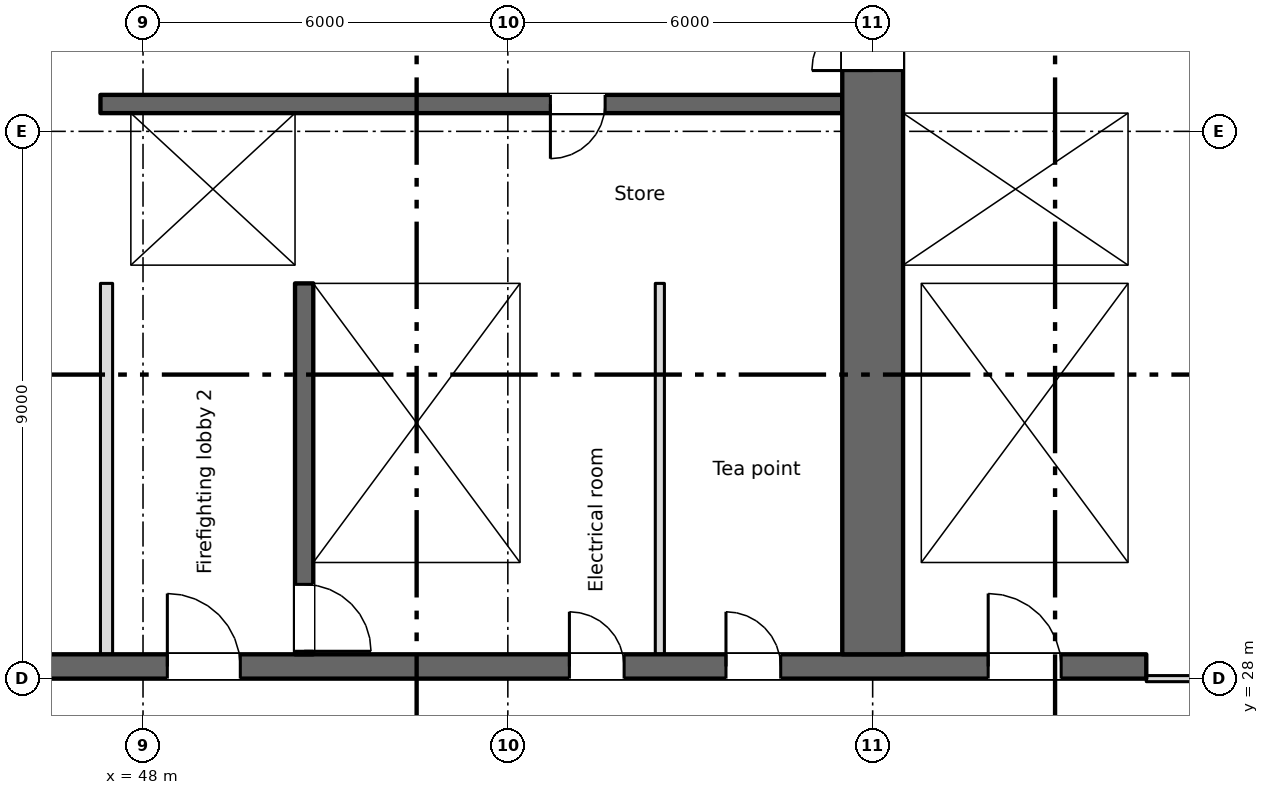
"""IFC4 building model, lengths in metres.
Left out: names, types, materials, properties, quantities, classifications, styles, units other than length and angle.
Written with IfcOpenShell. Run it as: python <this file> out.ifc"""

import sys

from ifc_helpers import new_model, si_unit, direction, frame, frame_2d, origin, place, context, subcontext, project, spatial, rectangle, extrude, element, fill, save


model = new_model("IFC4")
c1 = context("Model", 3, precision=1e-05, world=origin(), true_north=direction((0.0, 1.0)))
c2 = subcontext(c1, "Body", "Model", "MODEL_VIEW")
j1 = project(units=[si_unit("LENGTHUNIT", "METRE"), si_unit("PLANEANGLEUNIT", "RADIAN")], contexts=[c1])
p1 = place(None, origin())
s1 = spatial("IfcSite", under=j1, at=p1, CompositionType="ELEMENT")
p2 = place(p1, origin())
s2 = spatial("IfcBuilding", under=s1, at=p2, CompositionType="ELEMENT")
p3 = place(p2, frame((0.0, 0.0, 86.25)))
s3 = spatial("IfcBuildingStorey", under=s2, at=p3, CompositionType="ELEMENT", Elevation=86.25)
p4 = place(p3, frame((6.7, 28.2, 0.0), z_axis=(0.0, 0.0, 1.0), x_axis=(1.0, 0.0, 0.0)))
e1 = element("IfcWall", 1, at=p4, inside=s3, PredefinedType="SHEAR", context=c2, shape_type="SweptSolid", body=[
    extrude(rectangle(XDim=57.8, YDim=0.4, at=frame_2d((28.9, 0.0))), origin(), (0.0, 0.0, 1.0), 3.15),
])
p5 = place(p4, frame((12.812, 0.0, 0.0)))
e2 = element("IfcOpeningElement", 2, at=p5, cuts=e1, PredefinedType="OPENING", context=c2, shape_type="SweptSolid", body=[
    extrude(rectangle(XDim=0.9, YDim=2.1, at=frame_2d((0.45, 1.05))), frame((0.0, 0.21, 0.0), z_axis=(0.0, -1.0, 0.0), x_axis=(1.0, 0.0, 0.0)), (0.0, 0.0, 1.0), 0.42),
])
p6 = place(p4, frame((15.387, 0.0, 0.0)))
e3 = element("IfcOpeningElement", 3, at=p6, cuts=e1, PredefinedType="OPENING", context=c2, shape_type="SweptSolid", body=[
    extrude(rectangle(XDim=0.9, YDim=2.1, at=frame_2d((0.45, 1.05))), frame((0.0, 0.21, 0.0), z_axis=(0.0, -1.0, 0.0), x_axis=(1.0, 0.0, 0.0)), (0.0, 0.0, 1.0), 0.42),
])
p7 = place(p4, frame((48.312, 0.0, 0.0)))
e4 = element("IfcOpeningElement", 4, at=p7, cuts=e1, PredefinedType="OPENING", context=c2, shape_type="SweptSolid", body=[
    extrude(rectangle(XDim=0.9, YDim=2.1, at=frame_2d((0.45, 1.05))), frame((0.0, 0.21, 0.0), z_axis=(0.0, -1.0, 0.0), x_axis=(1.0, 0.0, 0.0)), (0.0, 0.0, 1.0), 0.42),
])
p8 = place(p4, frame((50.887, 0.0, 0.0)))
e5 = element("IfcOpeningElement", 5, at=p8, cuts=e1, PredefinedType="OPENING", context=c2, shape_type="SweptSolid", body=[
    extrude(rectangle(XDim=0.9, YDim=2.1, at=frame_2d((0.45, 1.05))), frame((0.0, 0.21, 0.0), z_axis=(0.0, -1.0, 0.0), x_axis=(1.0, 0.0, 0.0)), (0.0, 0.0, 1.0), 0.42),
])
p9 = place(p4, frame((0.562, 0.0, 0.0)))
e6 = element("IfcOpeningElement", 6, at=p9, cuts=e1, PredefinedType="OPENING", context=c2, shape_type="SweptSolid", body=[
    extrude(rectangle(XDim=0.9, YDim=2.1, at=frame_2d((0.45, 1.05))), frame((0.0, 0.21, 0.0), z_axis=(0.0, -1.0, 0.0), x_axis=(1.0, 0.0, 0.0)), (0.0, 0.0, 1.0), 0.42),
])
p10 = place(p4, frame((2.137, 0.0, 0.0)))
e7 = element("IfcOpeningElement", 7, at=p10, cuts=e1, PredefinedType="OPENING", context=c2, shape_type="SweptSolid", body=[
    extrude(rectangle(XDim=0.9, YDim=2.1, at=frame_2d((0.45, 1.05))), frame((0.0, 0.21, 0.0), z_axis=(0.0, -1.0, 0.0), x_axis=(1.0, 0.0, 0.0)), (0.0, 0.0, 1.0), 0.42),
])
p11 = place(p4, frame((4.7, 0.0, 0.0)))
e8 = element("IfcOpeningElement", 8, at=p11, cuts=e1, PredefinedType="OPENING", context=c2, shape_type="SweptSolid", body=[
    extrude(rectangle(XDim=1.2, YDim=2.1, at=frame_2d((0.6, 1.05))), frame((0.0, 0.21, 0.0), z_axis=(0.0, -1.0, 0.0), x_axis=(1.0, 0.0, 0.0)), (0.0, 0.0, 1.0), 0.42),
])
p12 = place(p4, frame((31.7, 0.0, 0.0)))
e9 = element("IfcOpeningElement", 9, at=p12, cuts=e1, PredefinedType="OPENING", context=c2, shape_type="SweptSolid", body=[
    extrude(rectangle(XDim=1.2, YDim=2.1, at=frame_2d((0.6, 1.05))), frame((0.0, 0.21, 0.0), z_axis=(0.0, -1.0, 0.0), x_axis=(1.0, 0.0, 0.0)), (0.0, 0.0, 1.0), 0.42),
])
p13 = place(p4, frame((55.2, 0.0, 0.0)))
e10 = element("IfcOpeningElement", 10, at=p13, cuts=e1, PredefinedType="OPENING", context=c2, shape_type="SweptSolid", body=[
    extrude(rectangle(XDim=1.2, YDim=2.1, at=frame_2d((0.6, 1.05))), frame((0.0, 0.21, 0.0), z_axis=(0.0, -1.0, 0.0), x_axis=(1.0, 0.0, 0.0)), (0.0, 0.0, 1.0), 0.42),
])
p14 = place(p4, frame((21.7, 0.0, 0.0)))
e11 = element("IfcOpeningElement", 11, at=p14, cuts=e1, PredefinedType="OPENING", context=c2, shape_type="SweptSolid", body=[
    extrude(rectangle(XDim=1.2, YDim=2.1, at=frame_2d((0.6, 1.05))), frame((0.0, 0.21, 0.0), z_axis=(0.0, -1.0, 0.0), x_axis=(1.0, 0.0, 0.0)), (0.0, 0.0, 1.0), 0.42),
])
p15 = place(p4, frame((41.7, 0.0, 0.0)))
e12 = element("IfcOpeningElement", 12, at=p15, cuts=e1, PredefinedType="OPENING", context=c2, shape_type="SweptSolid", body=[
    extrude(rectangle(XDim=1.2, YDim=2.1, at=frame_2d((0.6, 1.05))), frame((0.0, 0.21, 0.0), z_axis=(0.0, -1.0, 0.0), x_axis=(1.0, 0.0, 0.0)), (0.0, 0.0, 1.0), 0.42),
])
p16 = place(p4, frame((24.85, 0.0, 0.0)))
e13 = element("IfcOpeningElement", 13, at=p16, cuts=e1, PredefinedType="OPENING", context=c2, shape_type="SweptSolid", body=[
    extrude(rectangle(XDim=2.4, YDim=2.1, at=frame_2d((1.2, 1.05))), frame((0.0, 0.21, 0.0), z_axis=(0.0, -1.0, 0.0), x_axis=(1.0, 0.0, 0.0)), (0.0, 0.0, 1.0), 0.42),
])
p17 = place(p4, frame((37.35, 0.0, 0.0)))
e14 = element("IfcOpeningElement", 14, at=p17, cuts=e1, PredefinedType="OPENING", context=c2, shape_type="SweptSolid", body=[
    extrude(rectangle(XDim=2.4, YDim=2.1, at=frame_2d((1.2, 1.05))), frame((0.0, 0.21, 0.0), z_axis=(0.0, -1.0, 0.0), x_axis=(1.0, 0.0, 0.0)), (0.0, 0.0, 1.0), 0.42),
])
p18 = place(p4, frame((7.85, 0.0, 0.0)))
e15 = element("IfcOpeningElement", 15, at=p18, cuts=e1, PredefinedType="OPENING", context=c2, shape_type="SweptSolid", body=[
    extrude(rectangle(XDim=2.4, YDim=2.1, at=frame_2d((1.2, 1.05))), frame((0.0, 0.21, 0.0), z_axis=(0.0, -1.0, 0.0), x_axis=(1.0, 0.0, 0.0)), (0.0, 0.0, 1.0), 0.42),
])
p19 = place(p4, frame((28.85, 0.0, 0.0)))
e16 = element("IfcOpeningElement", 16, at=p19, cuts=e1, PredefinedType="OPENING", context=c2, shape_type="SweptSolid", body=[
    extrude(rectangle(XDim=0.9, YDim=2.1, at=frame_2d((0.45, 1.05))), frame((0.0, 0.21, 0.0), z_axis=(0.0, -1.0, 0.0), x_axis=(1.0, 0.0, 0.0)), (0.0, 0.0, 1.0), 0.42),
])
p20 = place(p4, frame((34.85, 0.0, 0.0)))
e17 = element("IfcOpeningElement", 17, at=p20, cuts=e1, PredefinedType="OPENING", context=c2, shape_type="SweptSolid", body=[
    extrude(rectangle(XDim=0.9, YDim=2.1, at=frame_2d((0.45, 1.05))), frame((0.0, 0.21, 0.0), z_axis=(0.0, -1.0, 0.0), x_axis=(1.0, 0.0, 0.0)), (0.0, 0.0, 1.0), 0.42),
])
p21 = place(p3, frame((64.35, 34.8, 0.0), z_axis=(0.0, 0.0, 1.0), x_axis=(0.0, 1.0, 0.0)))
e18 = element("IfcWall", 18, at=p21, inside=s3, PredefinedType="SHEAR", context=c2, shape_type="SweptSolid", body=[
    extrude(rectangle(XDim=10.2, YDim=0.3, at=frame_2d((5.1, 0.0))), origin(), (0.0, 0.0, 1.0), 3.15),
])
p22 = place(p3, frame((60.0, 28.4, 0.0), z_axis=(0.0, 0.0, 1.0), x_axis=(0.0, 1.0, 0.0)))
e19 = element("IfcWall", 19, at=p22, inside=s3, PredefinedType="SHEAR", context=c2, shape_type="SweptSolid", body=[
    extrude(rectangle(XDim=16.6, YDim=1.0, at=frame_2d((8.3, 0.0))), origin(), (0.0, 0.0, 1.0), 3.15),
])
p23 = place(p22, frame((9.6, 0.0, 0.0)))
e20 = element("IfcOpeningElement", 20, at=p23, cuts=e19, PredefinedType="OPENING", context=c2, shape_type="SweptSolid", body=[
    extrude(rectangle(XDim=2.0, YDim=2.1, at=frame_2d((1.0, 1.05))), frame((0.0, 0.51, 0.0), z_axis=(0.0, -1.0, 0.0), x_axis=(1.0, 0.0, 0.0)), (0.0, 0.0, 1.0), 1.02),
])
p24 = place(p22, frame((15.25, 0.0, 0.0)))
e21 = element("IfcOpeningElement", 21, at=p24, cuts=e19, PredefinedType="OPENING", context=c2, shape_type="SweptSolid", body=[
    extrude(rectangle(XDim=1.2, YDim=2.1, at=frame_2d((0.6, 1.05))), frame((0.0, 0.51, 0.0), z_axis=(0.0, -1.0, 0.0), x_axis=(1.0, 0.0, 0.0)), (0.0, 0.0, 1.0), 1.02),
])
p25 = place(p3, frame((50.65, 34.5, 0.0), z_axis=(0.0, 0.0, 1.0), x_axis=(0.0, -1.0, 0.0)))
e22 = element("IfcWall", 22, at=p25, inside=s3, PredefinedType="SHEAR", context=c2, shape_type="SweptSolid", body=[
    extrude(rectangle(XDim=6.1, YDim=0.3, at=frame_2d((3.05, 0.0))), origin(), (0.0, 0.0, 1.0), 3.15),
])
p26 = place(p25, frame((4.95, 0.0, 0.0)))
e23 = element("IfcOpeningElement", 23, at=p26, cuts=e22, PredefinedType="OPENING", context=c2, shape_type="SweptSolid", body=[
    extrude(rectangle(XDim=1.1, YDim=2.1, at=frame_2d((0.55, 1.05))), frame((0.0, 0.16, 0.0), z_axis=(0.0, -1.0, 0.0), x_axis=(1.0, 0.0, 0.0)), (0.0, 0.0, 1.0), 0.32),
])
for number, where, z_axis, x_axis in (
    (24, (54.35, 28.4, 0.0), (0.0, 0.0, 1.0), (0.0, 1.0, 0.0)),
    (25, (60.65, 28.4, 0.0), (0.0, 0.0, 1.0), (0.0, 1.0, 0.0)),
    (26, (64.35, 28.4, 0.0), (0.0, 0.0, 1.0), (0.0, 1.0, 0.0)),
):
    element("IfcWall", number, at=place(p3, frame(where, z_axis=z_axis, x_axis=x_axis)), inside=s3, PredefinedType="SHEAR", context=c2, shape_type="SweptSolid", body=[
        extrude(rectangle(XDim=6.1, YDim=0.3, at=frame_2d((3.05, 0.0))), origin(), (0.0, 0.0, 1.0), 3.15),
    ])
p27 = place(p3, frame((47.3, 34.65, 0.0), z_axis=(0.0, 0.0, 1.0), x_axis=(1.0, 0.0, 0.0)))
e27 = element("IfcWall", 27, at=p27, inside=s3, PredefinedType="SHEAR", context=c2, shape_type="SweptSolid", body=[
    extrude(rectangle(XDim=12.2, YDim=0.3, at=frame_2d((6.1, 0.0))), origin(), (0.0, 0.0, 1.0), 3.15),
])
p28 = place(p27, frame((1.3, 0.0, 0.0)))
e28 = element("IfcOpeningElement", 28, at=p28, cuts=e27, PredefinedType="OPENING", context=c2, shape_type="SweptSolid", body=[
    extrude(rectangle(XDim=1.1, YDim=2.1, at=frame_2d((0.55, 1.05))), frame((0.0, 0.16, 0.0), z_axis=(0.0, -1.0, 0.0), x_axis=(1.0, 0.0, 0.0)), (0.0, 0.0, 1.0), 0.32),
])
p29 = place(p3, frame((60.5, 34.65, 0.0), z_axis=(0.0, 0.0, 1.0), x_axis=(1.0, 0.0, 0.0)))
e29 = element("IfcWall", 29, at=p29, inside=s3, PredefinedType="SHEAR", context=c2, shape_type="SweptSolid", body=[
    extrude(rectangle(XDim=4.0, YDim=0.3, at=frame_2d((2.0, 0.0))), origin(), (0.0, 0.0, 1.0), 3.15),
])
p30 = place(p3, frame((59.5, 37.45, 0.0), z_axis=(0.0, 0.0, 1.0), x_axis=(-1.0, 0.0, 0.0)))
e30 = element("IfcWall", 30, at=p30, inside=s3, PredefinedType="SHEAR", context=c2, shape_type="SweptSolid", body=[
    extrude(rectangle(XDim=12.2, YDim=0.3, at=frame_2d((6.1, 0.0))), origin(), (0.0, 0.0, 1.0), 3.15),
])
p31 = place(p30, frame((3.9, 0.0, 0.0)))
e31 = element("IfcOpeningElement", 31, at=p31, cuts=e30, PredefinedType="OPENING", context=c2, shape_type="SweptSolid", body=[
    extrude(rectangle(XDim=0.9, YDim=2.1, at=frame_2d((0.45, 1.05))), frame((0.0, 0.16, 0.0), z_axis=(0.0, -1.0, 0.0), x_axis=(1.0, 0.0, 0.0)), (0.0, 0.0, 1.0), 0.32),
])
p32 = place(p3, frame((60.5, 37.45, 0.0), z_axis=(0.0, 0.0, 1.0), x_axis=(1.0, 0.0, 0.0)))
e32 = element("IfcWall", 32, at=p32, inside=s3, PredefinedType="SHEAR", context=c2, shape_type="SweptSolid", body=[
    extrude(rectangle(XDim=3.7, YDim=0.3, at=frame_2d((1.85, 0.0))), origin(), (0.0, 0.0, 1.0), 3.15),
])
p33 = place(p32, frame((1.3, 0.0, 0.0)))
e33 = element("IfcOpeningElement", 33, at=p33, cuts=e32, PredefinedType="OPENING", context=c2, shape_type="SweptSolid", body=[
    extrude(rectangle(XDim=1.1, YDim=2.1, at=frame_2d((0.55, 1.05))), frame((0.0, 0.16, 0.0), z_axis=(0.0, -1.0, 0.0), x_axis=(1.0, 0.0, 0.0)), (0.0, 0.0, 1.0), 0.32),
])
p34 = place(p3, frame((47.55, 34.8, 0.0), z_axis=(0.0, 0.0, 1.0), x_axis=(0.0, 1.0, 0.0)))
e34 = element("IfcWall", 34, at=p34, inside=s3, PredefinedType="SHEAR", context=c2, shape_type="SweptSolid", body=[
    extrude(rectangle(XDim=2.5, YDim=0.5, at=frame_2d((1.25, 0.0))), origin(), (0.0, 0.0, 1.0), 3.15),
])
p35 = place(p3, frame((50.65, 34.8, 0.0), z_axis=(0.0, 0.0, 1.0), x_axis=(0.0, 1.0, 0.0)))
e35 = element("IfcWall", 35, at=p35, inside=s3, PredefinedType="SHEAR", context=c2, shape_type="SweptSolid", body=[
    extrude(rectangle(XDim=2.5, YDim=0.3, at=frame_2d((1.25, 0.0))), origin(), (0.0, 0.0, 1.0), 3.15),
])
p36 = place(p3, frame((47.4, 28.4, 0.0), z_axis=(0.0, 0.0, 1.0), x_axis=(0.0, 1.0, 0.0)))
e36 = element("IfcWall", 36, at=p36, inside=s3, PredefinedType="PARTITIONING", context=c2, shape_type="SweptSolid", body=[
    extrude(rectangle(XDim=6.1, YDim=0.2, at=frame_2d((3.05, 0.0))), origin(), (0.0, 0.0, 1.0), 3.15),
])
p37 = place(p3, frame((56.5, 28.4, 0.0), z_axis=(0.0, 0.0, 1.0), x_axis=(0.0, 1.0, 0.0)))
e37 = element("IfcWall", 37, at=p37, inside=s3, PredefinedType="PARTITIONING", context=c2, shape_type="SweptSolid", body=[
    extrude(rectangle(XDim=6.1, YDim=0.15, at=frame_2d((3.05, 0.0))), origin(), (0.0, 0.0, 1.0), 3.15),
])
p38 = place(p3, frame((64.5, 28.0, 0.0), z_axis=(0.0, 0.0, 1.0), x_axis=(1.0, 0.0, 0.0)))
e38 = element("IfcWall", 38, at=p38, inside=s3, PredefinedType="PARTITIONING", context=c2, shape_type="SweptSolid", body=[
    extrude(rectangle(XDim=12.7, YDim=0.1, at=frame_2d((6.35, 0.0))), origin(), (0.0, 0.0, 1.0), 3.15),
])
p39 = place(p38, frame((8.975, 0.0, 0.0)))
e39 = element("IfcOpeningElement", 39, at=p39, cuts=e38, PredefinedType="OPENING", context=c2, shape_type="SweptSolid", body=[
    extrude(rectangle(XDim=1.8, YDim=2.1, at=frame_2d((0.9, 1.05))), frame((0.0, 0.06, 0.0), z_axis=(0.0, -1.0, 0.0), x_axis=(1.0, 0.0, 0.0)), (0.0, 0.0, 1.0), 0.12),
])
p40 = place(p38, frame((2.625, 0.0, 0.0)))
e40 = element("IfcOpeningElement", 40, at=p40, cuts=e38, PredefinedType="OPENING", context=c2, shape_type="SweptSolid", body=[
    extrude(rectangle(XDim=1.8, YDim=2.1, at=frame_2d((0.9, 1.05))), frame((0.0, 0.06, 0.0), z_axis=(0.0, -1.0, 0.0), x_axis=(1.0, 0.0, 0.0)), (0.0, 0.0, 1.0), 0.12),
])
p41 = place(p7, origin())
e41 = element("IfcDoor", 41, at=p41, inside=s3, OperationType="SINGLE_SWING_LEFT", PredefinedType="DOOR", context=c2, shape_type="SweptSolid", body=[
    extrude(rectangle(XDim=0.9, YDim=2.1, at=frame_2d((0.45, 1.05))), frame((0.0, 0.025, 0.0), z_axis=(0.0, -1.0, 0.0), x_axis=(1.0, 0.0, 0.0)), (0.0, 0.0, 1.0), 0.05),
])
fill(e4, e41)
p42 = place(p8, origin())
e42 = element("IfcDoor", 42, at=p42, inside=s3, OperationType="SINGLE_SWING_LEFT", PredefinedType="DOOR", context=c2, shape_type="SweptSolid", body=[
    extrude(rectangle(XDim=0.9, YDim=2.1, at=frame_2d((0.45, 1.05))), frame((0.0, 0.025, 0.0), z_axis=(0.0, -1.0, 0.0), x_axis=(1.0, 0.0, 0.0)), (0.0, 0.0, 1.0), 0.05),
])
fill(e5, e42)
p43 = place(p31, origin())
e43 = element("IfcDoor", 43, at=p43, inside=s3, OperationType="SINGLE_SWING_RIGHT", PredefinedType="DOOR", context=c2, shape_type="SweptSolid", body=[
    extrude(rectangle(XDim=0.9, YDim=2.1, at=frame_2d((0.45, 1.05))), frame((0.0, 0.025, 0.0), z_axis=(0.0, -1.0, 0.0), x_axis=(1.0, 0.0, 0.0)), (0.0, 0.0, 1.0), 0.05),
])
fill(e31, e43)
p44 = place(p33, origin())
e44 = element("IfcDoor", 44, at=p44, inside=s3, OperationType="SLIDING_TO_LEFT", PredefinedType="DOOR", context=c2, shape_type="SweptSolid", body=[
    extrude(rectangle(XDim=1.1, YDim=2.1, at=frame_2d((0.55, 1.05))), frame((0.0, 0.025, 0.0), z_axis=(0.0, -1.0, 0.0), x_axis=(1.0, 0.0, 0.0)), (0.0, 0.0, 1.0), 0.05),
])
fill(e33, e44)
p45 = place(p28, origin())
e45 = element("IfcDoor", 45, at=p45, inside=s3, OperationType="SLIDING_TO_LEFT", PredefinedType="DOOR", context=c2, shape_type="SweptSolid", body=[
    extrude(rectangle(XDim=1.1, YDim=2.1, at=frame_2d((0.55, 1.05))), frame((0.0, 0.025, 0.0), z_axis=(0.0, -1.0, 0.0), x_axis=(1.0, 0.0, 0.0)), (0.0, 0.0, 1.0), 0.05),
])
fill(e28, e45)
p46 = place(p26, origin())
e46 = element("IfcDoor", 46, at=p46, inside=s3, OperationType="SINGLE_SWING_RIGHT", PredefinedType="DOOR", context=c2, shape_type="SweptSolid", body=[
    extrude(rectangle(XDim=1.1, YDim=2.1, at=frame_2d((0.55, 1.05))), frame((0.0, 0.025, 0.0), z_axis=(0.0, -1.0, 0.0), x_axis=(1.0, 0.0, 0.0)), (0.0, 0.0, 1.0), 0.05),
])
fill(e23, e46)
p47 = place(p13, origin())
e47 = element("IfcDoor", 47, at=p47, inside=s3, OperationType="SINGLE_SWING_LEFT", PredefinedType="DOOR", context=c2, shape_type="SweptSolid", body=[
    extrude(rectangle(XDim=1.2, YDim=2.1, at=frame_2d((0.6, 1.05))), frame((0.0, 0.025, 0.0), z_axis=(0.0, -1.0, 0.0), x_axis=(1.0, 0.0, 0.0)), (0.0, 0.0, 1.0), 0.05),
])
fill(e10, e47)
p48 = place(p15, origin())
e48 = element("IfcDoor", 48, at=p48, inside=s3, OperationType="SINGLE_SWING_LEFT", PredefinedType="DOOR", context=c2, shape_type="SweptSolid", body=[
    extrude(rectangle(XDim=1.2, YDim=2.1, at=frame_2d((0.6, 1.05))), frame((0.0, 0.025, 0.0), z_axis=(0.0, -1.0, 0.0), x_axis=(1.0, 0.0, 0.0)), (0.0, 0.0, 1.0), 0.05),
])
fill(e12, e48)
p49 = place(p23, origin())
e49 = element("IfcDoor", 49, at=p49, inside=s3, OperationType="DOUBLE_DOOR_SINGLE_SWING", PredefinedType="DOOR", context=c2, shape_type="SweptSolid", body=[
    extrude(rectangle(XDim=2.0, YDim=2.1, at=frame_2d((1.0, 1.05))), frame((0.0, 0.025, 0.0), z_axis=(0.0, -1.0, 0.0), x_axis=(1.0, 0.0, 0.0)), (0.0, 0.0, 1.0), 0.05),
])
fill(e20, e49)
save(model, sys.argv[1])
